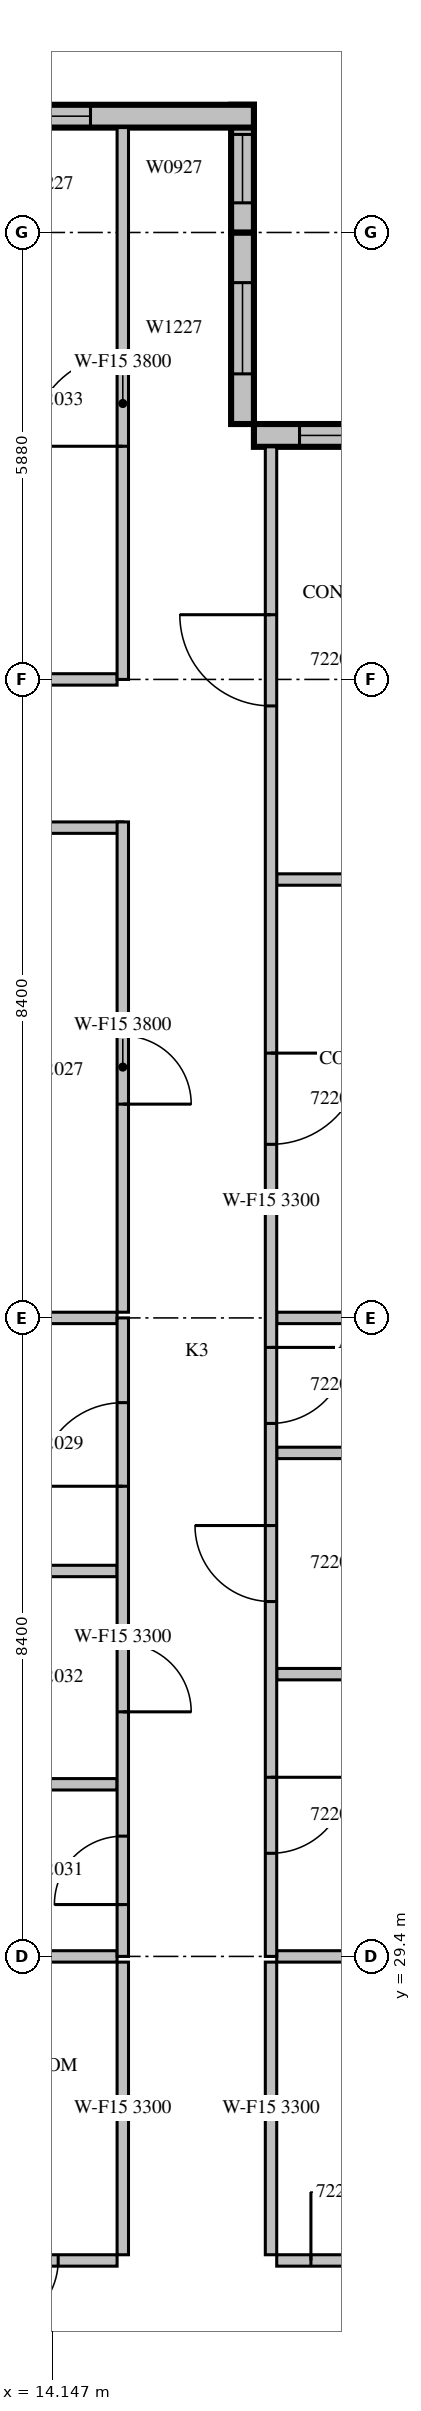
"""IFC4 building model, lengths in metres.
Left out: names, types, materials, properties, quantities, classifications, styles, units other than length and angle.
Written with IfcOpenShell. Run it as: python <this file> out.ifc"""

import sys

from ifc_helpers import new_model, si_unit, direction, frame, frame_2d, origin, place, context, subcontext, project, spatial, rectangle, extrude, source, transform, mapped, element, fill, save


model = new_model("IFC4")
c1 = context("Model", 3, precision=1e-05, world=origin(), true_north=direction((0.0, 1.0)))
c2 = subcontext(c1, "Body", "Model", "MODEL_VIEW")
j1 = project(units=[si_unit("LENGTHUNIT", "METRE"), si_unit("PLANEANGLEUNIT", "RADIAN")], contexts=[c1])
p1 = place(None, origin())
s1 = spatial("IfcSite", under=j1, at=p1, CompositionType="ELEMENT")
p2 = place(p1, origin())
s2 = spatial("IfcBuilding", under=s1, at=p2, CompositionType="ELEMENT")
p3 = place(p2, frame((0.0, 0.0, 103.5)))
s3 = spatial("IfcBuildingStorey", under=s2, at=p3, CompositionType="ELEMENT", Elevation=103.5)
m1 = source(origin(), c2, "Body", "SweptSolid", [
    extrude(rectangle(XDim=4.2, YDim=0.3, at=frame_2d((2.1, 0.0))), origin(), (0.0, 0.0, 1.0), 3.8),
])
p4 = place(p3, frame((21.0, 49.41, 0.0), z_axis=(0.0, 0.0, 1.0), x_axis=(-1.0, 0.0, 0.0)))
e1 = element("IfcWall", 1, at=p4, inside=s3, PredefinedType="STANDARD", context=c2, shape_type="MappedRepresentation", body=[
    mapped(m1, transform((0.0, 0.0, 0.0), scale=1.0)),
])
m2 = source(origin(), c2, "Body", "SweptSolid", [
    extrude(rectangle(XDim=3.0, YDim=2.7, at=frame_2d((1.5, 1.35))), frame((0.0, 0.16, 0.0), z_axis=(0.0, -1.0, 0.0), x_axis=(1.0, 0.0, 0.0)), (0.0, 0.0, 1.0), 0.32),
])
p5 = place(p4, frame((0.6, 0.0, 0.6)))
e2 = element("IfcOpeningElement", 2, at=p5, cuts=e1, PredefinedType="OPENING", context=c2, shape_type="MappedRepresentation", body=[
    mapped(m2, transform((0.0, 0.0, 0.0), scale=1.0)),
])
m3 = source(origin(), c2, "Body", "SweptSolid", [
    extrude(rectangle(XDim=2.52, YDim=0.3, at=frame_2d((1.26, 0.0))), origin(), (0.0, 0.0, 1.0), 3.8),
])
p6 = place(p3, frame((16.65, 49.56, 0.0), z_axis=(0.0, 0.0, 1.0), x_axis=(0.0, 1.0, 0.0)))
e3 = element("IfcWall", 3, at=p6, inside=s3, PredefinedType="STANDARD", context=c2, shape_type="MappedRepresentation", body=[
    mapped(m3, transform((0.0, 0.0, 0.0), scale=1.0)),
])
m4 = source(origin(), c2, "Body", "SweptSolid", [
    extrude(rectangle(XDim=1.2, YDim=2.7, at=frame_2d((0.6, 1.35))), frame((0.0, 0.16, 0.0), z_axis=(0.0, -1.0, 0.0), x_axis=(1.0, 0.0, 0.0)), (0.0, 0.0, 1.0), 0.32),
])
p7 = place(p6, frame((0.66, 0.0, 0.6)))
e4 = element("IfcOpeningElement", 4, at=p7, cuts=e3, PredefinedType="OPENING", context=c2, shape_type="MappedRepresentation", body=[
    mapped(m4, transform((0.0, 0.0, 0.0), scale=1.0)),
])
m5 = source(origin(), c2, "Body", "SweptSolid", [
    extrude(rectangle(XDim=1.68, YDim=0.3, at=frame_2d((0.84, 0.0))), origin(), (0.0, 0.0, 1.0), 3.8),
])
p8 = place(p3, frame((16.65, 52.08, 0.0), z_axis=(0.0, 0.0, 1.0), x_axis=(0.0, 1.0, 0.0)))
e5 = element("IfcWall", 5, at=p8, inside=s3, PredefinedType="STANDARD", context=c2, shape_type="MappedRepresentation", body=[
    mapped(m5, transform((0.0, 0.0, 0.0), scale=1.0)),
])
m6 = source(origin(), c2, "Body", "SweptSolid", [
    extrude(rectangle(XDim=0.9, YDim=2.7, at=frame_2d((0.45, 1.35))), frame((0.0, 0.16, 0.0), z_axis=(0.0, -1.0, 0.0), x_axis=(1.0, 0.0, 0.0)), (0.0, 0.0, 1.0), 0.32),
])
p9 = place(p8, frame((0.39, 0.0, 0.6)))
e6 = element("IfcOpeningElement", 6, at=p9, cuts=e5, PredefinedType="OPENING", context=c2, shape_type="MappedRepresentation", body=[
    mapped(m6, transform((0.0, 0.0, 0.0), scale=1.0)),
])
m7 = source(origin(), c2, "Body", "SweptSolid", [
    extrude(rectangle(XDim=10.5, YDim=0.3, at=frame_2d((5.25, 0.0))), origin(), (0.0, 0.0, 1.0), 3.8),
])
p10 = place(p3, frame((16.8, 53.61, 0.0), z_axis=(0.0, 0.0, 1.0), x_axis=(-1.0, 0.0, 0.0)))
e7 = element("IfcWall", 7, at=p10, inside=s3, PredefinedType="STANDARD", context=c2, shape_type="MappedRepresentation", body=[
    mapped(m7, transform((0.0, 0.0, 0.0), scale=1.0)),
])
p11 = place(p10, frame((2.15, 0.0, 0.6)))
e8 = element("IfcOpeningElement", 8, at=p11, cuts=e7, PredefinedType="OPENING", context=c2, shape_type="MappedRepresentation", body=[
    mapped(m4, transform((0.0, 0.0, 0.0), scale=1.0)),
])
m8 = source(origin(), c2, "Body", "SweptSolid", [
    extrude(rectangle(XDim=1.8, YDim=2.7, at=frame_2d((0.9, 1.35))), frame((0.0, 0.16, 0.0), z_axis=(0.0, -1.0, 0.0), x_axis=(1.0, 0.0, 0.0)), (0.0, 0.0, 1.0), 0.32),
])
p12 = place(p10, frame((8.025, 0.0, 0.6)))
e9 = element("IfcOpeningElement", 9, at=p12, cuts=e7, PredefinedType="OPENING", context=c2, shape_type="MappedRepresentation", body=[
    mapped(m8, transform((0.0, 0.0, 0.0), scale=1.0)),
])
p13 = place(p3, frame((6.505, 25.4, 0.0), z_axis=(0.0, 0.0, 1.0), x_axis=(1.0, 0.0, 0.0)))
e10 = element("IfcWall", 10, at=p13, inside=s3, PredefinedType="PARTITIONING", context=c2, shape_type="SweptSolid", body=[
    extrude(rectangle(XDim=8.495, YDim=0.15, at=frame_2d((4.247, 0.0))), origin(), (0.0, 0.0, 1.0), 2.8),
])
m9 = source(origin(), c2, "Body", "SweptSolid", [
    extrude(rectangle(XDim=0.9, YDim=2.1, at=frame_2d((0.45, 1.05))), frame((0.0, 0.085, 0.0), z_axis=(0.0, -1.0, 0.0), x_axis=(1.0, 0.0, 0.0)), (0.0, 0.0, 1.0), 0.17),
])
p14 = place(p13, frame((1.745, 0.0, 0.0)))
e11 = element("IfcOpeningElement", 11, at=p14, cuts=e10, PredefinedType="OPENING", context=c2, shape_type="MappedRepresentation", body=[
    mapped(m9, transform((0.0, 0.0, 0.0), scale=1.0)),
])
p15 = place(p13, frame((6.82, 0.0, 0.0)))
e12 = element("IfcOpeningElement", 12, at=p15, cuts=e10, PredefinedType="OPENING", context=c2, shape_type="MappedRepresentation", body=[
    mapped(m9, transform((0.0, 0.0, 0.0), scale=1.0)),
])
m10 = source(origin(), c2, "Body", "SweptSolid", [
    extrude(rectangle(XDim=3.6, YDim=0.15, at=frame_2d((1.8, 0.0))), origin(), (0.0, 0.0, 1.0), 2.8),
])
p16 = place(p3, frame((17.1, 25.4, 0.0), z_axis=(0.0, 0.0, 1.0), x_axis=(1.0, 0.0, 0.0)))
e13 = element("IfcWall", 13, at=p16, inside=s3, PredefinedType="PARTITIONING", context=c2, shape_type="MappedRepresentation", body=[
    mapped(m10, transform((0.0, 0.0, 0.0), scale=1.0)),
])
p17 = place(p16, frame((0.45, 0.0, 0.0)))
e14 = element("IfcOpeningElement", 14, at=p17, cuts=e13, PredefinedType="OPENING", context=c2, shape_type="MappedRepresentation", body=[
    mapped(m9, transform((0.0, 0.0, 0.0), scale=1.0)),
])
m11 = source(origin(), c2, "Body", "SweptSolid", [
    extrude(rectangle(XDim=3.85, YDim=0.15, at=frame_2d((1.925, 0.0))), origin(), (0.0, 0.0, 1.0), 3.3),
])
for number, where, z_axis, x_axis in (
    (15, (15.075, 25.475, 0.0), (0.0, 0.0, 1.0), (0.0, 1.0, 0.0)),
    (16, (17.025, 29.325, 0.0), (0.0, 0.0, 1.0), (0.0, -1.0, 0.0)),
):
    element("IfcWall", number, at=place(p3, frame(where, z_axis=z_axis, x_axis=x_axis)), inside=s3, PredefinedType="PARTITIONING", context=c2, shape_type="MappedRepresentation", body=[
        mapped(m11, transform((0.0, 0.0, 0.0), scale=1.0)),
    ])
m12 = source(origin(), c2, "Body", "SweptSolid", [
    extrude(rectangle(XDim=3.976, YDim=0.15, at=frame_2d((1.988, 0.0))), origin(), (0.0, 0.0, 1.0), 3.8),
])
p18 = place(p3, frame((15.0, 29.4, 0.0), z_axis=(0.0, 0.0, 1.0), x_axis=(-1.0, 0.0, 0.0)))
e17 = element("IfcWall", 17, at=p18, inside=s3, PredefinedType="PARTITIONING", context=c2, shape_type="MappedRepresentation", body=[
    mapped(m12, transform((0.0, 0.0, 0.0), scale=1.0)),
])
m13 = source(origin(), c2, "Body", "SweptSolid", [
    extrude(rectangle(XDim=2.851, YDim=0.15, at=frame_2d((1.425, 0.0))), origin(), (0.0, 0.0, 1.0), 3.8),
])
p19 = place(p3, frame((19.951, 29.4, 0.0), z_axis=(0.0, 0.0, 1.0), x_axis=(-1.0, 0.0, 0.0)))
e18 = element("IfcWall", 18, at=p19, inside=s3, PredefinedType="PARTITIONING", context=c2, shape_type="MappedRepresentation", body=[
    mapped(m13, transform((0.0, 0.0, 0.0), scale=1.0)),
])
m14 = source(origin(), c2, "Body", "SweptSolid", [
    extrude(rectangle(XDim=3.975, YDim=0.15, at=frame_2d((1.988, 0.0))), origin(), (0.0, 0.0, 1.0), 3.8),
])
p20 = place(p3, frame((15.075, 44.25, 0.0), z_axis=(0.0, 0.0, 1.0), x_axis=(-1.0, 0.0, 0.0)))
e19 = element("IfcWall", 19, at=p20, inside=s3, PredefinedType="PARTITIONING", context=c2, shape_type="MappedRepresentation", body=[
    mapped(m14, transform((0.0, 0.0, 0.0), scale=1.0)),
])
m15 = source(origin(), c2, "Body", "SweptSolid", [
    extrude(rectangle(XDim=6.45, YDim=0.15, at=frame_2d((3.225, 0.0))), origin(), (0.0, 0.0, 1.0), 3.8),
])
p21 = place(p3, frame((15.075, 37.875, 0.0), z_axis=(0.0, 0.0, 1.0), x_axis=(0.0, 1.0, 0.0)))
e20 = element("IfcWall", 20, at=p21, inside=s3, PredefinedType="PARTITIONING", context=c2, shape_type="MappedRepresentation", body=[
    mapped(m15, transform((0.0, 0.0, 0.0), scale=1.0)),
])
p22 = place(p21, frame((2.737, 0.0, 0.0)))
e21 = element("IfcOpeningElement", 21, at=p22, cuts=e20, PredefinedType="OPENING", context=c2, shape_type="MappedRepresentation", body=[
    mapped(m9, transform((0.0, 0.0, 0.0), scale=1.0)),
])
m16 = source(origin(), c2, "Body", "SweptSolid", [
    extrude(rectangle(XDim=3.825, YDim=0.15, at=frame_2d((1.913, 0.0))), origin(), (0.0, 0.0, 1.0), 3.8),
])
p23 = place(p3, frame((15.0, 31.665, 0.0), z_axis=(0.0, 0.0, 1.0), x_axis=(-1.0, 0.0, 0.0)))
e22 = element("IfcWall", 22, at=p23, inside=s3, PredefinedType="PARTITIONING", context=c2, shape_type="MappedRepresentation", body=[
    mapped(m16, transform((0.0, 0.0, 0.0), scale=1.0)),
])
p24 = place(p3, frame((15.0, 34.471, 0.0), z_axis=(0.0, 0.0, 1.0), x_axis=(-1.0, 0.0, 0.0)))
e23 = element("IfcWall", 23, at=p24, inside=s3, PredefinedType="PARTITIONING", context=c2, shape_type="SweptSolid", body=[
    extrude(rectangle(XDim=3.825, YDim=0.15, at=frame_2d((1.913, 0.0))), origin(), (0.0, 0.0, 1.0), 3.3),
])
for number, where, z_axis, x_axis in (
    (24, (15.0, 37.8, 0.0), (0.0, 0.0, 1.0), (-1.0, 0.0, 0.0)),
    (25, (15.0, 46.2, 0.0), (0.0, 0.0, 1.0), (-1.0, 0.0, 0.0)),
):
    element("IfcWall", number, at=place(p3, frame(where, z_axis=z_axis, x_axis=x_axis)), inside=s3, PredefinedType="PARTITIONING", context=c2, shape_type="MappedRepresentation", body=[
        mapped(m16, transform((0.0, 0.0, 0.0), scale=1.0)),
    ])
for number, where, z_axis, x_axis in (
    (26, (17.1, 33.113, 0.0), (0.0, 0.0, 1.0), (1.0, 0.0, 0.0)),
    (27, (17.1, 36.024, 0.0), (0.0, 0.0, 1.0), (1.0, 0.0, 0.0)),
):
    element("IfcWall", number, at=place(p3, frame(where, z_axis=z_axis, x_axis=x_axis)), inside=s3, PredefinedType="PARTITIONING", context=c2, shape_type="MappedRepresentation", body=[
        mapped(m10, transform((0.0, 0.0, 0.0), scale=1.0)),
    ])
m17 = source(origin(), c2, "Body", "SweptSolid", [
    extrude(rectangle(XDim=3.6, YDim=0.15, at=frame_2d((1.8, 0.0))), origin(), (0.0, 0.0, 1.0), 3.8),
])
p25 = place(p3, frame((17.1, 43.568, 0.0), z_axis=(0.0, 0.0, 1.0), x_axis=(1.0, 0.0, 0.0)))
e28 = element("IfcWall", 28, at=p25, inside=s3, PredefinedType="PARTITIONING", context=c2, shape_type="MappedRepresentation", body=[
    mapped(m17, transform((0.0, 0.0, 0.0), scale=1.0)),
])
p26 = place(p3, frame((19.951, 37.8, 0.0), z_axis=(0.0, 0.0, 1.0), x_axis=(-1.0, 0.0, 0.0)))
e29 = element("IfcWall", 29, at=p26, inside=s3, PredefinedType="PARTITIONING", context=c2, shape_type="MappedRepresentation", body=[
    mapped(m13, transform((0.0, 0.0, 0.0), scale=1.0)),
])
m18 = source(origin(), c2, "Body", "SweptSolid", [
    extrude(rectangle(XDim=8.4, YDim=0.15, at=frame_2d((4.2, 0.0))), origin(), (0.0, 0.0, 1.0), 3.3),
])
p27 = place(p3, frame((15.075, 29.4, 0.0), z_axis=(0.0, 0.0, 1.0), x_axis=(0.0, 1.0, 0.0)))
e30 = element("IfcWall", 30, at=p27, inside=s3, PredefinedType="PARTITIONING", context=c2, shape_type="MappedRepresentation", body=[
    mapped(m18, transform((0.0, 0.0, 0.0), scale=1.0)),
])
m19 = source(origin(), c2, "Body", "SweptSolid", [
    extrude(rectangle(XDim=1.1, YDim=2.1, at=frame_2d((0.55, 1.05))), frame((0.0, 0.085, 0.0), z_axis=(0.0, -1.0, 0.0), x_axis=(1.0, 0.0, 0.0)), (0.0, 0.0, 1.0), 0.17),
])
p28 = place(p27, frame((6.185, 0.0, 0.0)))
e31 = element("IfcOpeningElement", 31, at=p28, cuts=e30, PredefinedType="OPENING", context=c2, shape_type="MappedRepresentation", body=[
    mapped(m19, transform((0.0, 0.0, 0.0), scale=1.0)),
])
p29 = place(p27, frame((0.682, 0.0, 0.0)))
e32 = element("IfcOpeningElement", 32, at=p29, cuts=e30, PredefinedType="OPENING", context=c2, shape_type="MappedRepresentation", body=[
    mapped(m9, transform((0.0, 0.0, 0.0), scale=1.0)),
])
p30 = place(p27, frame((3.218, 0.0, 0.0)))
e33 = element("IfcOpeningElement", 33, at=p30, cuts=e30, PredefinedType="OPENING", context=c2, shape_type="MappedRepresentation", body=[
    mapped(m9, transform((0.0, 0.0, 0.0), scale=1.0)),
])
m20 = source(origin(), c2, "Body", "SweptSolid", [
    extrude(rectangle(XDim=7.26, YDim=0.15, at=frame_2d((3.63, 0.0))), origin(), (0.0, 0.0, 1.0), 3.8),
])
p31 = place(p3, frame((15.075, 46.2, 0.0), z_axis=(0.0, 0.0, 1.0), x_axis=(0.0, 1.0, 0.0)))
e34 = element("IfcWall", 34, at=p31, inside=s3, PredefinedType="PARTITIONING", context=c2, shape_type="MappedRepresentation", body=[
    mapped(m20, transform((0.0, 0.0, 0.0), scale=1.0)),
])
m21 = source(origin(), c2, "Body", "SweptSolid", [
    extrude(rectangle(XDim=1.2, YDim=2.1, at=frame_2d((0.6, 1.05))), frame((0.0, 0.085, 0.0), z_axis=(0.0, -1.0, 0.0), x_axis=(1.0, 0.0, 0.0)), (0.0, 0.0, 1.0), 0.17),
])
p32 = place(p31, frame((3.067, 0.0, 0.0)))
e35 = element("IfcOpeningElement", 35, at=p32, cuts=e34, PredefinedType="OPENING", context=c2, shape_type="MappedRepresentation", body=[
    mapped(m21, transform((0.0, 0.0, 0.0), scale=1.0)),
])
p33 = place(p3, frame((17.025, 49.26, 0.0), z_axis=(0.0, 0.0, 1.0), x_axis=(0.0, -1.0, 0.0)))
e36 = element("IfcWall", 36, at=p33, inside=s3, PredefinedType="PARTITIONING", context=c2, shape_type="SweptSolid", body=[
    extrude(rectangle(XDim=19.86, YDim=0.15, at=frame_2d((9.93, 0.0))), origin(), (0.0, 0.0, 1.0), 3.3),
])
m22 = source(origin(), c2, "Body", "SweptSolid", [
    extrude(rectangle(XDim=1.0, YDim=2.1, at=frame_2d((0.5, 1.05))), frame((0.0, 0.085, 0.0), z_axis=(0.0, -1.0, 0.0), x_axis=(1.0, 0.0, 0.0)), (0.0, 0.0, 1.0), 0.17),
])
p34 = place(p33, frame((17.503, 0.0, 0.0)))
e37 = element("IfcOpeningElement", 37, at=p34, cuts=e36, PredefinedType="OPENING", context=c2, shape_type="MappedRepresentation", body=[
    mapped(m22, transform((0.0, 0.0, 0.0), scale=1.0)),
])
p35 = place(p33, frame((14.191, 0.0, 0.0)))
e38 = element("IfcOpeningElement", 38, at=p35, cuts=e36, PredefinedType="OPENING", context=c2, shape_type="MappedRepresentation", body=[
    mapped(m22, transform((0.0, 0.0, 0.0), scale=1.0)),
])
p36 = place(p33, frame((11.848, 0.0, 0.0)))
e39 = element("IfcOpeningElement", 39, at=p36, cuts=e36, PredefinedType="OPENING", context=c2, shape_type="MappedRepresentation", body=[
    mapped(m22, transform((0.0, 0.0, 0.0), scale=1.0)),
])
p37 = place(p33, frame((7.976, 0.0, 0.0)))
e40 = element("IfcOpeningElement", 40, at=p37, cuts=e36, PredefinedType="OPENING", context=c2, shape_type="MappedRepresentation", body=[
    mapped(m21, transform((0.0, 0.0, 0.0), scale=1.0)),
])
p38 = place(p33, frame((2.209, 0.0, 0.0)))
e41 = element("IfcOpeningElement", 41, at=p38, cuts=e36, PredefinedType="OPENING", context=c2, shape_type="MappedRepresentation", body=[
    mapped(m21, transform((0.0, 0.0, 0.0), scale=1.0)),
])
m23 = source(origin(), c2, "Body", "SweptSolid", [
    extrude(rectangle(XDim=3.0, YDim=2.7, at=frame_2d((1.5, 1.35))), frame((0.0, 0.03, 0.0), z_axis=(0.0, -1.0, 0.0), x_axis=(1.0, 0.0, 0.0)), (0.0, 0.0, 1.0), 0.06),
])
p39 = place(p5, origin())
e42 = element("IfcWindow", 42, at=p39, inside=s3, PartitioningType="SINGLE_PANEL", PredefinedType="WINDOW", context=c2, shape_type="MappedRepresentation", body=[
    mapped(m23, transform((0.0, 0.0, 0.0), scale=1.0)),
])
fill(e2, e42)
m24 = source(origin(), c2, "Body", "SweptSolid", [
    extrude(rectangle(XDim=1.2, YDim=2.7, at=frame_2d((0.6, 1.35))), frame((0.0, 0.03, 0.0), z_axis=(0.0, -1.0, 0.0), x_axis=(1.0, 0.0, 0.0)), (0.0, 0.0, 1.0), 0.06),
])
p40 = place(p7, origin())
e43 = element("IfcWindow", 43, at=p40, inside=s3, PartitioningType="SINGLE_PANEL", PredefinedType="WINDOW", context=c2, shape_type="MappedRepresentation", body=[
    mapped(m24, transform((0.0, 0.0, 0.0), scale=1.0)),
])
fill(e4, e43)
m25 = source(origin(), c2, "Body", "SweptSolid", [
    extrude(rectangle(XDim=0.9, YDim=2.7, at=frame_2d((0.45, 1.35))), frame((0.0, 0.03, 0.0), z_axis=(0.0, -1.0, 0.0), x_axis=(1.0, 0.0, 0.0)), (0.0, 0.0, 1.0), 0.06),
])
p41 = place(p9, origin())
e44 = element("IfcWindow", 44, at=p41, inside=s3, PartitioningType="SINGLE_PANEL", PredefinedType="WINDOW", context=c2, shape_type="MappedRepresentation", body=[
    mapped(m25, transform((0.0, 0.0, 0.0), scale=1.0)),
])
fill(e6, e44)
p42 = place(p11, origin())
e45 = element("IfcWindow", 45, at=p42, inside=s3, PartitioningType="SINGLE_PANEL", PredefinedType="WINDOW", context=c2, shape_type="MappedRepresentation", body=[
    mapped(m24, transform((0.0, 0.0, 0.0), scale=1.0)),
])
fill(e8, e45)
m26 = source(origin(), c2, "Body", "SweptSolid", [
    extrude(rectangle(XDim=0.9, YDim=2.1, at=frame_2d((0.45, 1.05))), frame((0.0, 0.025, 0.0), z_axis=(0.0, -1.0, 0.0), x_axis=(1.0, 0.0, 0.0)), (0.0, 0.0, 1.0), 0.05),
])
p43 = place(p15, origin())
e46 = element("IfcDoor", 46, at=p43, inside=s3, OperationType="SINGLE_SWING_RIGHT", PredefinedType="DOOR", context=c2, shape_type="MappedRepresentation", body=[
    mapped(m26, transform((0.0, 0.0, 0.0), scale=1.0)),
])
fill(e12, e46)
p44 = place(p17, origin())
e47 = element("IfcDoor", 47, at=p44, inside=s3, OperationType="SINGLE_SWING_LEFT", PredefinedType="DOOR", context=c2, shape_type="MappedRepresentation", body=[
    mapped(m26, transform((0.0, 0.0, 0.0), scale=1.0)),
])
fill(e14, e47)
p45 = place(p22, origin())
e48 = element("IfcDoor", 48, at=p45, inside=s3, OperationType="SINGLE_SWING_RIGHT", PredefinedType="DOOR", context=c2, shape_type="MappedRepresentation", body=[
    mapped(m26, transform((0.0, 0.0, 0.0), scale=1.0)),
])
fill(e21, e48)
m27 = source(origin(), c2, "Body", "SweptSolid", [
    extrude(rectangle(XDim=1.1, YDim=2.1, at=frame_2d((0.55, 1.05))), frame((0.0, 0.025, 0.0), z_axis=(0.0, -1.0, 0.0), x_axis=(1.0, 0.0, 0.0)), (0.0, 0.0, 1.0), 0.05),
])
p46 = place(p28, origin())
e49 = element("IfcDoor", 49, at=p46, inside=s3, OperationType="SINGLE_SWING_LEFT", PredefinedType="DOOR", context=c2, shape_type="MappedRepresentation", body=[
    mapped(m27, transform((0.0, 0.0, 0.0), scale=1.0)),
])
fill(e31, e49)
p47 = place(p29, origin())
e50 = element("IfcDoor", 50, at=p47, inside=s3, OperationType="SINGLE_SWING_LEFT", PredefinedType="DOOR", context=c2, shape_type="MappedRepresentation", body=[
    mapped(m26, transform((0.0, 0.0, 0.0), scale=1.0)),
])
fill(e32, e50)
p48 = place(p30, origin())
e51 = element("IfcDoor", 51, at=p48, inside=s3, OperationType="SINGLE_SWING_RIGHT", PredefinedType="DOOR", context=c2, shape_type="MappedRepresentation", body=[
    mapped(m26, transform((0.0, 0.0, 0.0), scale=1.0)),
])
fill(e33, e51)
m28 = source(origin(), c2, "Body", "SweptSolid", [
    extrude(rectangle(XDim=1.2, YDim=2.1, at=frame_2d((0.6, 1.05))), frame((0.0, 0.025, 0.0), z_axis=(0.0, -1.0, 0.0), x_axis=(1.0, 0.0, 0.0)), (0.0, 0.0, 1.0), 0.05),
])
p49 = place(p32, origin())
e52 = element("IfcDoor", 52, at=p49, inside=s3, OperationType="SINGLE_SWING_LEFT", PredefinedType="DOOR", context=c2, shape_type="MappedRepresentation", body=[
    mapped(m28, transform((0.0, 0.0, 0.0), scale=1.0)),
])
fill(e35, e52)
m29 = source(origin(), c2, "Body", "SweptSolid", [
    extrude(rectangle(XDim=1.0, YDim=2.1, at=frame_2d((0.5, 1.05))), frame((0.0, 0.025, 0.0), z_axis=(0.0, -1.0, 0.0), x_axis=(1.0, 0.0, 0.0)), (0.0, 0.0, 1.0), 0.05),
])
p50 = place(p34, origin())
e53 = element("IfcDoor", 53, at=p50, inside=s3, OperationType="SINGLE_SWING_LEFT", PredefinedType="DOOR", context=c2, shape_type="MappedRepresentation", body=[
    mapped(m29, transform((0.0, 0.0, 0.0), scale=1.0)),
])
fill(e37, e53)
p51 = place(p35, origin())
e54 = element("IfcDoor", 54, at=p51, inside=s3, OperationType="SINGLE_SWING_RIGHT", PredefinedType="DOOR", context=c2, shape_type="MappedRepresentation", body=[
    mapped(m29, transform((0.0, 0.0, 0.0), scale=1.0)),
])
fill(e38, e54)
p52 = place(p36, origin())
e55 = element("IfcDoor", 55, at=p52, inside=s3, OperationType="SINGLE_SWING_LEFT", PredefinedType="DOOR", context=c2, shape_type="MappedRepresentation", body=[
    mapped(m29, transform((0.0, 0.0, 0.0), scale=1.0)),
])
fill(e39, e55)
p53 = place(p37, origin())
e56 = element("IfcDoor", 56, at=p53, inside=s3, OperationType="SINGLE_SWING_LEFT", PredefinedType="DOOR", context=c2, shape_type="MappedRepresentation", body=[
    mapped(m28, transform((0.0, 0.0, 0.0), scale=1.0)),
])
fill(e40, e56)
p54 = place(p38, origin())
e57 = element("IfcDoor", 57, at=p54, inside=s3, OperationType="SINGLE_SWING_RIGHT", PredefinedType="DOOR", context=c2, shape_type="MappedRepresentation", body=[
    mapped(m28, transform((0.0, 0.0, 0.0), scale=1.0)),
])
fill(e41, e57)
save(model, sys.argv[1])
